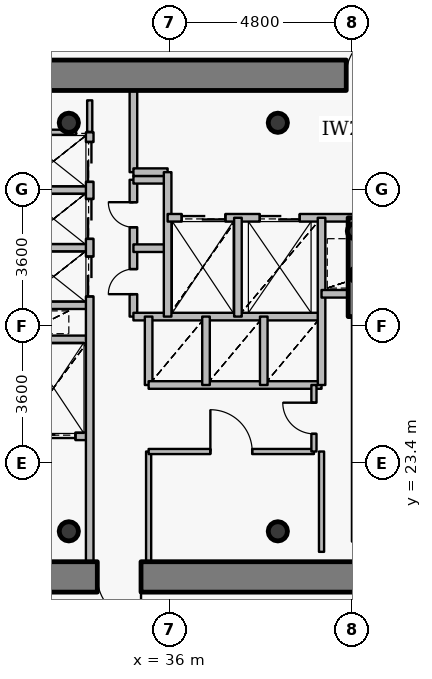
"""IFC4 building model, lengths in metres.
Left out: names, types, materials, properties, quantities, classifications, styles, units other than length and angle.
Written with IfcOpenShell. Run it as: python <this file> out.ifc"""

import sys

from ifc_helpers import new_model, si_unit, direction, frame, frame_2d, origin, origin_2d, place, context, subcontext, project, spatial, rectangle, hollow_circle, extrude, source, transform, mapped, element, fill, save


model = new_model("IFC4")
c1 = context("Model", 3, precision=1e-05, world=origin(), true_north=direction((0.0, 1.0)))
c2 = subcontext(c1, "Body", "Model", "MODEL_VIEW")
j1 = project(units=[si_unit("LENGTHUNIT", "METRE"), si_unit("PLANEANGLEUNIT", "RADIAN")], contexts=[c1])
p1 = place(None, origin())
s1 = spatial("IfcSite", under=j1, at=p1, CompositionType="ELEMENT")
p2 = place(p1, origin())
s2 = spatial("IfcBuilding", under=s1, at=p2, CompositionType="ELEMENT")
p3 = place(p2, frame((0.0, 0.0, 174.9)))
s3 = spatial("IfcBuildingStorey", under=s2, at=p3, CompositionType="ELEMENT", Elevation=174.9)
for number, where, z_axis, x_axis in (
    (1, (33.35, 21.6, 0.0), (0.0, 0.0, 1.0), (1.0, 0.0, 0.0)),
    (2, (38.85, 21.6, 0.0), (0.0, 0.0, 1.0), (1.0, 0.0, 0.0)),
    (3, (38.85, 32.35, 0.0), (0.0, 0.0, 1.0), (1.0, 0.0, 0.0)),
    (4, (33.35, 32.35, 0.0), (0.0, 0.0, 1.0), (1.0, 0.0, 0.0)),
):
    element("IfcColumn", number, at=place(p3, frame(where, z_axis=z_axis, x_axis=x_axis)), inside=s3, PredefinedType="COLUMN", context=c2, shape_type="SweptSolid", body=[
        extrude(hollow_circle(Radius=0.254, WallThickness=0.02, at=origin_2d()), origin(), (0.0, 0.0, 1.0), 3.75),
    ])
for number, where, z_axis, x_axis in (
    (5, (40.95, 28.35, 0.0), (0.0, 0.0, 1.0), (1.0, 0.0, 0.0)),
    (6, (40.88, 29.5, 0.0), (0.0, 0.0, 1.0), (1.0, 0.0, 0.0)),
):
    element("IfcColumn", number, at=place(p3, frame(where, z_axis=z_axis, x_axis=x_axis)), inside=s3, PredefinedType="COLUMN", context=c2, shape_type="SweptSolid", body=[
        extrude(hollow_circle(Radius=0.203, WallThickness=0.016, at=origin_2d()), origin(), (0.0, 0.0, 1.0), 3.75),
    ])
p4 = place(p3, frame((27.2, 33.6, 0.0), z_axis=(0.0, 0.0, 1.0), x_axis=(1.0, 0.0, 0.0)))
e7 = element("IfcWall", 7, at=p4, inside=s3, PredefinedType="SHEAR", context=c2, shape_type="SweptSolid", body=[
    extrude(rectangle(XDim=17.6, YDim=0.8, at=frame_2d((8.8, 0.0))), origin(), (0.0, 0.0, 1.0), 2.95),
])
p5 = place(p4, frame((13.45, 0.0, 0.0)))
e8 = element("IfcOpeningElement", 8, at=p5, cuts=e7, PredefinedType="OPENING", context=c2, shape_type="SweptSolid", body=[
    extrude(rectangle(XDim=1.15, YDim=2.15, at=origin_2d()), frame((0.575, 0.41, 1.075), z_axis=(0.0, -1.0, 0.0), x_axis=(1.0, 0.0, 0.0)), (0.0, 0.0, 1.0), 0.82),
])
p6 = place(p3, frame((44.8, 20.4, 0.0), z_axis=(0.0, 0.0, 1.0), x_axis=(-1.0, 0.0, 0.0)))
e9 = element("IfcWall", 9, at=p6, inside=s3, PredefinedType="SHEAR", context=c2, shape_type="SweptSolid", body=[
    extrude(rectangle(XDim=17.6, YDim=0.8, at=frame_2d((8.8, 0.0))), origin(), (0.0, 0.0, 1.0), 2.95),
])
p7 = place(p6, frame((9.55, 0.0, 0.0)))
e10 = element("IfcOpeningElement", 10, at=p7, cuts=e9, PredefinedType="OPENING", context=c2, shape_type="SweptSolid", body=[
    extrude(rectangle(XDim=1.15, YDim=2.15, at=origin_2d()), frame((0.575, 0.41, 1.075), z_axis=(0.0, -1.0, 0.0), x_axis=(1.0, 0.0, 0.0)), (0.0, 0.0, 1.0), 0.82),
])
p8 = place(p3, frame((40.9, 27.25, 0.0), z_axis=(0.0, 0.0, 1.0), x_axis=(0.0, 1.0, 0.0)))
e11 = element("IfcWall", 11, at=p8, inside=s3, PredefinedType="SHEAR", context=c2, shape_type="SweptSolid", body=[
    extrude(rectangle(XDim=2.6, YDim=0.4, at=frame_2d((1.3, 0.0))), origin(), (0.0, 0.0, 1.0), 3.1),
])
p9 = place(p3, frame((32.0, 24.1, 0.0), z_axis=(0.0, 0.0, 1.0), x_axis=(1.0, 0.0, 0.0)))
e12 = element("IfcWall", 12, at=p9, inside=s3, PredefinedType="PARTITIONING", context=c2, shape_type="SweptSolid", body=[
    extrude(rectangle(XDim=1.9, YDim=0.2, at=frame_2d((0.95, 0.0))), origin(), (0.0, 0.0, 1.0), 3.085),
])
p10 = place(p9, frame((0.375, 0.0, 0.0)))
e13 = element("IfcOpeningElement", 13, at=p10, cuts=e12, PredefinedType="OPENING", context=c2, shape_type="SweptSolid", body=[
    extrude(rectangle(XDim=1.15, YDim=2.15, at=origin_2d()), frame((0.575, 0.11, 1.075), z_axis=(0.0, -1.0, 0.0), x_axis=(1.0, 0.0, 0.0)), (0.0, 0.0, 1.0), 0.22),
])
for number, where, z_axis, x_axis in (
    (14, (32.0, 26.65, 0.0), (0.0, 0.0, 1.0), (1.0, 0.0, 0.0)),
    (15, (32.0, 27.55, 0.0), (0.0, 0.0, 1.0), (1.0, 0.0, 0.0)),
    (16, (32.0, 29.06, 0.0), (0.0, 0.0, 1.0), (1.0, 0.0, 0.0)),
    (17, (32.0, 30.58, 0.0), (0.0, 0.0, 1.0), (1.0, 0.0, 0.0)),
):
    element("IfcWall", number, at=place(p3, frame(where, z_axis=z_axis, x_axis=x_axis)), inside=s3, PredefinedType="PARTITIONING", context=c2, shape_type="SweptSolid", body=[
        extrude(rectangle(XDim=1.9, YDim=0.2, at=frame_2d((0.95, 0.0))), origin(), (0.0, 0.0, 1.0), 3.085),
    ])
p11 = place(p3, frame((33.9, 20.8, 0.0), z_axis=(0.0, 0.0, 1.0), x_axis=(0.0, 1.0, 0.0)))
e18 = element("IfcWall", 18, at=p11, inside=s3, PredefinedType="PARTITIONING", context=c2, shape_type="SweptSolid", body=[
    extrude(rectangle(XDim=11.3, YDim=0.2, at=frame_2d((5.65, 0.0))), origin(), (0.0, 0.0, 1.0), 3.085),
])
p12 = place(p11, frame((6.98, 0.0, 0.0)))
e19 = element("IfcOpeningElement", 19, at=p12, cuts=e18, PredefinedType="OPENING", context=c2, shape_type="SweptSolid", body=[
    extrude(rectangle(XDim=1.05, YDim=2.15, at=origin_2d()), frame((0.525, 0.11, 1.075), z_axis=(0.0, -1.0, 0.0), x_axis=(1.0, 0.0, 0.0)), (0.0, 0.0, 1.0), 0.22),
])
p13 = place(p11, frame((8.495, 0.0, 0.0)))
e20 = element("IfcOpeningElement", 20, at=p13, cuts=e18, PredefinedType="OPENING", context=c2, shape_type="SweptSolid", body=[
    extrude(rectangle(XDim=1.05, YDim=2.15, at=origin_2d()), frame((0.525, 0.11, 1.075), z_axis=(0.0, -1.0, 0.0), x_axis=(1.0, 0.0, 0.0)), (0.0, 0.0, 1.0), 0.22),
])
p14 = place(p11, frame((9.995, 0.0, 0.0)))
e21 = element("IfcOpeningElement", 21, at=p14, cuts=e18, PredefinedType="OPENING", context=c2, shape_type="SweptSolid", body=[
    extrude(rectangle(XDim=1.05, YDim=2.15, at=origin_2d()), frame((0.525, 0.11, 1.075), z_axis=(0.0, -1.0, 0.0), x_axis=(1.0, 0.0, 0.0)), (0.0, 0.0, 1.0), 0.22),
])
p15 = place(p3, frame((35.05, 27.25, 0.0), z_axis=(0.0, 0.0, 1.0), x_axis=(0.0, 1.0, 0.0)))
e22 = element("IfcWall", 22, at=p15, inside=s3, PredefinedType="PARTITIONING", context=c2, shape_type="SweptSolid", body=[
    extrude(rectangle(XDim=3.6, YDim=0.2, at=frame_2d((1.8, 0.0))), origin(), (0.0, 0.0, 1.0), 3.5),
])
p16 = place(p15, frame((0.59, 0.0, 0.0)))
e23 = element("IfcOpeningElement", 23, at=p16, cuts=e22, PredefinedType="OPENING", context=c2, shape_type="SweptSolid", body=[
    extrude(rectangle(XDim=0.66, YDim=2.05, at=origin_2d()), frame((0.33, 0.11, 1.025), z_axis=(0.0, -1.0, 0.0), x_axis=(1.0, 0.0, 0.0)), (0.0, 0.0, 1.0), 0.22),
])
p17 = place(p15, frame((2.35, 0.0, 0.0)))
e24 = element("IfcOpeningElement", 24, at=p17, cuts=e22, PredefinedType="OPENING", context=c2, shape_type="SweptSolid", body=[
    extrude(rectangle(XDim=0.66, YDim=2.05, at=origin_2d()), frame((0.33, 0.11, 1.025), z_axis=(0.0, -1.0, 0.0), x_axis=(1.0, 0.0, 0.0)), (0.0, 0.0, 1.0), 0.22),
])
p18 = place(p3, frame((35.05, 27.25, 0.0), z_axis=(0.0, 0.0, 1.0), x_axis=(1.0, 0.0, 0.0)))
e25 = element("IfcWall", 25, at=p18, inside=s3, PredefinedType="PARTITIONING", context=c2, shape_type="SweptSolid", body=[
    extrude(rectangle(XDim=4.95, YDim=0.2, at=frame_2d((2.475, 0.0))), origin(), (0.0, 0.0, 1.0), 3.085),
])
for number, where, z_axis, x_axis in (
    (26, (35.05, 29.05, 0.0), (0.0, 0.0, 1.0), (1.0, 0.0, 0.0)),
    (27, (35.05, 30.85, 0.0), (0.0, 0.0, 1.0), (1.0, 0.0, 0.0)),
):
    element("IfcWall", number, at=place(p3, frame(where, z_axis=z_axis, x_axis=x_axis)), inside=s3, PredefinedType="PARTITIONING", context=c2, shape_type="SweptSolid", body=[
        extrude(rectangle(XDim=0.9, YDim=0.2, at=frame_2d((0.45, 0.0))), origin(), (0.0, 0.0, 1.0), 3.5),
    ])
p19 = place(p3, frame((35.05, 31.05, 0.0), z_axis=(0.0, 0.0, 1.0), x_axis=(0.0, 1.0, 0.0)))
e28 = element("IfcWall", 28, at=p19, inside=s3, PredefinedType="PARTITIONING", context=c2, shape_type="SweptSolid", body=[
    extrude(rectangle(XDim=2.15, YDim=0.2, at=frame_2d((1.075, 0.0))), origin(), (0.0, 0.0, 1.0), 3.085),
])
p20 = place(p3, frame((35.05, 31.05, 0.0), z_axis=(0.0, 0.0, 1.0), x_axis=(1.0, 0.0, 0.0)))
e29 = element("IfcWall", 29, at=p20, inside=s3, PredefinedType="PARTITIONING", context=c2, shape_type="SweptSolid", body=[
    extrude(rectangle(XDim=0.9, YDim=0.2, at=frame_2d((0.45, 0.0))), origin(), (0.0, 0.0, 1.0), 3.5),
])
p21 = place(p3, frame((35.45, 20.8, 0.0), z_axis=(0.0, 0.0, 1.0), x_axis=(0.0, 1.0, 0.0)))
e30 = element("IfcWall", 30, at=p21, inside=s3, PredefinedType="PARTITIONING", context=c2, shape_type="SweptSolid", body=[
    extrude(rectangle(XDim=2.9, YDim=0.135, at=frame_2d((1.45, 0.0))), origin(), (0.0, 0.0, 1.0), 3.085),
])
p22 = place(p3, frame((35.45, 23.7, 0.0), z_axis=(0.0, 0.0, 1.0), x_axis=(1.0, 0.0, 0.0)))
e31 = element("IfcWall", 31, at=p22, inside=s3, PredefinedType="PARTITIONING", context=c2, shape_type="SweptSolid", body=[
    extrude(rectangle(XDim=4.35, YDim=0.135, at=frame_2d((2.175, 0.0))), origin(), (0.0, 0.0, 1.0), 3.085),
])
p23 = place(p22, frame((1.625, 0.0, 0.0)))
e32 = element("IfcOpeningElement", 32, at=p23, cuts=e31, PredefinedType="OPENING", context=c2, shape_type="SweptSolid", body=[
    extrude(rectangle(XDim=1.1, YDim=2.15, at=origin_2d()), frame((0.55, 0.078, 1.075), z_axis=(0.0, -1.0, 0.0), x_axis=(1.0, 0.0, 0.0)), (0.0, 0.0, 1.0), 0.155),
])
p24 = place(p3, frame((35.45, 25.45, 0.0), z_axis=(0.0, 0.0, 1.0), x_axis=(0.0, 1.0, 0.0)))
e33 = element("IfcWall", 33, at=p24, inside=s3, PredefinedType="PARTITIONING", context=c2, shape_type="SweptSolid", body=[
    extrude(rectangle(XDim=1.8, YDim=0.2, at=frame_2d((0.9, 0.0))), origin(), (0.0, 0.0, 1.0), 3.5),
])
p25 = place(p3, frame((35.45, 25.45, 0.0), z_axis=(0.0, 0.0, 1.0), x_axis=(1.0, 0.0, 0.0)))
e34 = element("IfcWall", 34, at=p25, inside=s3, PredefinedType="PARTITIONING", context=c2, shape_type="SweptSolid", body=[
    extrude(rectangle(XDim=4.55, YDim=0.2, at=frame_2d((2.275, 0.0))), origin(), (0.0, 0.0, 1.0), 3.085),
])
p26 = place(p3, frame((35.95, 27.25, 0.0), z_axis=(0.0, 0.0, 1.0), x_axis=(0.0, 1.0, 0.0)))
e35 = element("IfcWall", 35, at=p26, inside=s3, PredefinedType="PARTITIONING", context=c2, shape_type="SweptSolid", body=[
    extrude(rectangle(XDim=3.8, YDim=0.2, at=frame_2d((1.9, 0.0))), origin(), (0.0, 0.0, 1.0), 3.5),
])
p27 = place(p3, frame((35.95, 29.85, 0.0), z_axis=(0.0, 0.0, 1.0), x_axis=(1.0, 0.0, 0.0)))
e36 = element("IfcWall", 36, at=p27, inside=s3, PredefinedType="PARTITIONING", context=c2, shape_type="SweptSolid", body=[
    extrude(rectangle(XDim=8.49, YDim=0.2, at=frame_2d((4.245, 0.0))), origin(), (0.0, 0.0, 1.0), 3.085),
])
p28 = place(p27, frame((6.1, 0.0, 0.0)))
e37 = element("IfcOpeningElement", 37, at=p28, cuts=e36, PredefinedType="OPENING", context=c2, shape_type="SweptSolid", body=[
    extrude(rectangle(XDim=1.2, YDim=2.15, at=origin_2d()), frame((0.6, 0.11, 1.075), z_axis=(0.0, -1.0, 0.0), x_axis=(1.0, 0.0, 0.0)), (0.0, 0.0, 1.0), 0.22),
])
p29 = place(p27, frame((0.37, 0.0, 0.0)))
e38 = element("IfcOpeningElement", 38, at=p29, cuts=e36, PredefinedType="OPENING", context=c2, shape_type="SweptSolid", body=[
    extrude(rectangle(XDim=1.15, YDim=2.15, at=origin_2d()), frame((0.575, 0.11, 1.075), z_axis=(0.0, -1.0, 0.0), x_axis=(1.0, 0.0, 0.0)), (0.0, 0.0, 1.0), 0.22),
])
p30 = place(p27, frame((2.425, 0.0, 0.0)))
e39 = element("IfcOpeningElement", 39, at=p30, cuts=e36, PredefinedType="OPENING", context=c2, shape_type="SweptSolid", body=[
    extrude(rectangle(XDim=1.05, YDim=2.15, at=origin_2d()), frame((0.525, 0.11, 1.075), z_axis=(0.0, -1.0, 0.0), x_axis=(1.0, 0.0, 0.0)), (0.0, 0.0, 1.0), 0.22),
])
p31 = place(p3, frame((36.96, 25.45, 0.0), z_axis=(0.0, 0.0, 1.0), x_axis=(0.0, 1.0, 0.0)))
e40 = element("IfcWall", 40, at=p31, inside=s3, PredefinedType="PARTITIONING", context=c2, shape_type="SweptSolid", body=[
    extrude(rectangle(XDim=1.8, YDim=0.2, at=frame_2d((0.9, 0.0))), origin(), (0.0, 0.0, 1.0), 3.5),
])
p32 = place(p3, frame((37.8, 27.25, 0.0), z_axis=(0.0, 0.0, 1.0), x_axis=(0.0, 1.0, 0.0)))
e41 = element("IfcWall", 41, at=p32, inside=s3, PredefinedType="PARTITIONING", context=c2, shape_type="SweptSolid", body=[
    extrude(rectangle(XDim=2.6, YDim=0.2, at=frame_2d((1.3, 0.0))), origin(), (0.0, 0.0, 1.0), 3.5),
])
p33 = place(p3, frame((38.48, 25.45, 0.0), z_axis=(0.0, 0.0, 1.0), x_axis=(0.0, 1.0, 0.0)))
e42 = element("IfcWall", 42, at=p33, inside=s3, PredefinedType="PARTITIONING", context=c2, shape_type="SweptSolid", body=[
    extrude(rectangle(XDim=1.8, YDim=0.2, at=frame_2d((0.9, 0.0))), origin(), (0.0, 0.0, 1.0), 3.5),
])
p34 = place(p3, frame((39.8, 23.7, 0.0), z_axis=(0.0, 0.0, 1.0), x_axis=(0.0, 1.0, 0.0)))
e43 = element("IfcWall", 43, at=p34, inside=s3, PredefinedType="PARTITIONING", context=c2, shape_type="SweptSolid", body=[
    extrude(rectangle(XDim=1.75, YDim=0.135, at=frame_2d((0.875, 0.0))), origin(), (0.0, 0.0, 1.0), 3.5),
])
p35 = place(p34, frame((0.465, 0.0, 0.0)))
e44 = element("IfcOpeningElement", 44, at=p35, cuts=e43, PredefinedType="OPENING", context=c2, shape_type="SweptSolid", body=[
    extrude(rectangle(XDim=0.82, YDim=2.1, at=origin_2d()), frame((0.41, 0.078, 1.05), z_axis=(0.0, -1.0, 0.0), x_axis=(1.0, 0.0, 0.0)), (0.0, 0.0, 1.0), 0.155),
])
p36 = place(p3, frame((40.0, 25.45, 0.0), z_axis=(0.0, 0.0, 1.0), x_axis=(0.0, 1.0, 0.0)))
e45 = element("IfcWall", 45, at=p36, inside=s3, PredefinedType="PARTITIONING", context=c2, shape_type="SweptSolid", body=[
    extrude(rectangle(XDim=4.4, YDim=0.2, at=frame_2d((2.2, 0.0))), origin(), (0.0, 0.0, 1.0), 3.5),
])
p37 = place(p3, frame((40.0, 27.85, 0.0), z_axis=(0.0, 0.0, 1.0), x_axis=(1.0, 0.0, 0.0)))
e46 = element("IfcWall", 46, at=p37, inside=s3, PredefinedType="PARTITIONING", context=c2, shape_type="SweptSolid", body=[
    extrude(rectangle(XDim=0.9, YDim=0.2, at=frame_2d((0.45, 0.0))), origin(), (0.0, 0.0, 1.0), 3.5),
])
p38 = place(p3, frame((40.9, 21.33, 0.0), z_axis=(0.0, 0.0, 1.0), x_axis=(0.0, 1.0, 0.0)))
e47 = element("IfcWall", 47, at=p38, inside=s3, PredefinedType="PARTITIONING", context=c2, shape_type="SweptSolid", body=[
    extrude(rectangle(XDim=5.91, YDim=0.2, at=frame_2d((2.955, 0.0))), origin(), (0.0, 0.0, 1.0), 3.035),
])
p39 = place(p3, frame((32.36, 32.1, 0.0), z_axis=(0.0, 0.0, 1.0), x_axis=(1.0, 0.0, 0.0)))
e48 = element("IfcWall", 48, at=p39, inside=s3, PredefinedType="PARTITIONING", context=c2, shape_type="SweptSolid", body=[
    extrude(rectangle(XDim=1.18, YDim=0.135, at=frame_2d((0.59, 0.0))), origin(), (0.0, 0.0, 1.0), 3.085),
])
p40 = place(p3, frame((40.0, 23.7, 0.0), z_axis=(0.0, 0.0, 1.0), x_axis=(0.0, -1.0, 0.0)))
e49 = element("IfcWall", 49, at=p40, inside=s3, PredefinedType="PARTITIONING", context=c2, shape_type="SweptSolid", body=[
    extrude(rectangle(XDim=2.64, YDim=0.135, at=frame_2d((1.32, 0.0))), origin(), (0.0, 0.0, 1.0), 3.035),
])
p41 = place(p3, frame((33.9, 32.11, 0.0), z_axis=(0.0, 0.0, 1.0), x_axis=(0.0, 1.0, 0.0)))
e50 = element("IfcWall", 50, at=p41, inside=s3, PredefinedType="PARTITIONING", context=c2, shape_type="SweptSolid", body=[
    extrude(rectangle(XDim=0.83, YDim=0.135, at=frame_2d((0.415, 0.0))), origin(), (0.0, 0.0, 1.0), 3.085),
])
m1 = source(origin(), c2, "Body", "SweptSolid", [
    extrude(rectangle(XDim=1.15, YDim=2.15, at=origin_2d()), frame((0.575, 0.025, 1.075), z_axis=(0.0, -1.0, 0.0), x_axis=(1.0, 0.0, 0.0)), (0.0, 0.0, 1.0), 0.05),
])
p42 = place(p5, origin())
e51 = element("IfcDoor", 51, at=p42, inside=s3, OperationType="SINGLE_SWING_RIGHT", PredefinedType="DOOR", context=c2, shape_type="MappedRepresentation", body=[
    mapped(m1, transform((0.0, 0.0, 0.0), x_axis=(1.0, 0.0, 0.0), y_axis=(0.0, 1.0, 0.0), z_axis=(0.0, 0.0, 1.0), scale=1.0)),
])
fill(e8, e51)
p43 = place(p7, origin())
e52 = element("IfcDoor", 52, at=p43, inside=s3, OperationType="SINGLE_SWING_LEFT", PredefinedType="DOOR", context=c2, shape_type="MappedRepresentation", body=[
    mapped(m1, transform((0.0, 0.0, 0.0), x_axis=(1.0, 0.0, 0.0), y_axis=(0.0, 1.0, 0.0), z_axis=(0.0, 0.0, 1.0), scale=1.0)),
])
fill(e10, e52)
m2 = source(origin(), c2, "Body", "SweptSolid", [
    extrude(rectangle(XDim=1.15, YDim=2.15, at=origin_2d()), frame((0.575, 0.025, 1.075), z_axis=(0.0, -1.0, 0.0), x_axis=(1.0, 0.0, 0.0)), (0.0, 0.0, 1.0), 0.05),
])
p44 = place(p29, origin())
e53 = element("IfcDoor", 53, at=p44, inside=s3, OperationType="DOUBLE_DOOR_SLIDING", PredefinedType="USERDEFINED", context=c2, shape_type="MappedRepresentation", body=[
    mapped(m2, transform((0.0, 0.0, 0.0), x_axis=(1.0, 0.0, 0.0), y_axis=(0.0, 1.0, 0.0), z_axis=(0.0, 0.0, 1.0), scale=1.0)),
])
fill(e38, e53)
p45 = place(p10, origin())
e54 = element("IfcDoor", 54, at=p45, inside=s3, OperationType="DOUBLE_DOOR_SLIDING", PredefinedType="USERDEFINED", context=c2, shape_type="MappedRepresentation", body=[
    mapped(m2, transform((0.0, 0.0, 0.0), x_axis=(1.0, 0.0, 0.0), y_axis=(0.0, 1.0, 0.0), z_axis=(0.0, 0.0, 1.0), scale=1.0)),
])
fill(e13, e54)
m3 = source(origin(), c2, "Body", "SweptSolid", [
    extrude(rectangle(XDim=1.05, YDim=2.15, at=origin_2d()), frame((0.525, 0.025, 1.075), z_axis=(0.0, -1.0, 0.0), x_axis=(1.0, 0.0, 0.0)), (0.0, 0.0, 1.0), 0.05),
])
p46 = place(p30, origin())
e55 = element("IfcDoor", 55, at=p46, inside=s3, OperationType="DOUBLE_DOOR_SLIDING", PredefinedType="USERDEFINED", context=c2, shape_type="MappedRepresentation", body=[
    mapped(m3, transform((0.0, 0.0, 0.0), x_axis=(1.0, 0.0, 0.0), y_axis=(0.0, 1.0, 0.0), z_axis=(0.0, 0.0, 1.0), scale=1.0)),
])
fill(e39, e55)
p47 = place(p12, origin())
e56 = element("IfcDoor", 56, at=p47, inside=s3, OperationType="DOUBLE_DOOR_SLIDING", PredefinedType="USERDEFINED", context=c2, shape_type="MappedRepresentation", body=[
    mapped(m3, transform((0.0, 0.0, 0.0), x_axis=(1.0, 0.0, 0.0), y_axis=(0.0, 1.0, 0.0), z_axis=(0.0, 0.0, 1.0), scale=1.0)),
])
fill(e19, e56)
p48 = place(p13, origin())
e57 = element("IfcDoor", 57, at=p48, inside=s3, OperationType="DOUBLE_DOOR_SLIDING", PredefinedType="USERDEFINED", context=c2, shape_type="MappedRepresentation", body=[
    mapped(m3, transform((0.0, 0.0, 0.0), x_axis=(1.0, 0.0, 0.0), y_axis=(0.0, 1.0, 0.0), z_axis=(0.0, 0.0, 1.0), scale=1.0)),
])
fill(e20, e57)
p49 = place(p14, origin())
e58 = element("IfcDoor", 58, at=p49, inside=s3, OperationType="DOUBLE_DOOR_SLIDING", PredefinedType="USERDEFINED", context=c2, shape_type="MappedRepresentation", body=[
    mapped(m3, transform((0.0, 0.0, 0.0), x_axis=(1.0, 0.0, 0.0), y_axis=(0.0, 1.0, 0.0), z_axis=(0.0, 0.0, 1.0), scale=1.0)),
])
fill(e21, e58)
m4 = source(origin(), c2, "Body", "SweptSolid", [
    extrude(rectangle(XDim=0.66, YDim=2.05, at=origin_2d()), frame((0.33, 0.025, 1.025), z_axis=(0.0, -1.0, 0.0), x_axis=(1.0, 0.0, 0.0)), (0.0, 0.0, 1.0), 0.05),
])
p50 = place(p16, origin())
e59 = element("IfcDoor", 59, at=p50, inside=s3, OperationType="SINGLE_SWING_LEFT", PredefinedType="USERDEFINED", context=c2, shape_type="MappedRepresentation", body=[
    mapped(m4, transform((0.0, 0.0, 0.0), x_axis=(1.0, 0.0, 0.0), y_axis=(0.0, 1.0, 0.0), z_axis=(0.0, 0.0, 1.0), scale=1.0)),
])
fill(e23, e59)
p51 = place(p17, origin())
e60 = element("IfcDoor", 60, at=p51, inside=s3, OperationType="SINGLE_SWING_RIGHT", PredefinedType="USERDEFINED", context=c2, shape_type="MappedRepresentation", body=[
    mapped(m4, transform((0.0, 0.0, 0.0), x_axis=(1.0, 0.0, 0.0), y_axis=(0.0, 1.0, 0.0), z_axis=(0.0, 0.0, 1.0), scale=1.0)),
])
fill(e24, e60)
m5 = source(origin(), c2, "Body", "SweptSolid", [
    extrude(rectangle(XDim=1.1, YDim=2.15, at=origin_2d()), frame((0.55, 0.025, 1.075), z_axis=(0.0, -1.0, 0.0), x_axis=(1.0, 0.0, 0.0)), (0.0, 0.0, 1.0), 0.05),
])
p52 = place(p23, origin())
e61 = element("IfcDoor", 61, at=p52, inside=s3, OperationType="SINGLE_SWING_LEFT", PredefinedType="DOOR", context=c2, shape_type="MappedRepresentation", body=[
    mapped(m5, transform((0.0, 0.0, 0.0), x_axis=(1.0, 0.0, 0.0), y_axis=(0.0, 1.0, 0.0), z_axis=(0.0, 0.0, 1.0), scale=1.0)),
])
fill(e32, e61)
m6 = source(origin(), c2, "Body", "SweptSolid", [
    extrude(rectangle(XDim=0.82, YDim=2.1, at=origin_2d()), frame((0.41, 0.025, 1.05), z_axis=(0.0, -1.0, 0.0), x_axis=(1.0, 0.0, 0.0)), (0.0, 0.0, 1.0), 0.05),
])
p53 = place(p35, origin())
e62 = element("IfcDoor", 62, at=p53, inside=s3, OperationType="SINGLE_SWING_RIGHT", PredefinedType="DOOR", context=c2, shape_type="MappedRepresentation", body=[
    mapped(m6, transform((0.0, 0.0, 0.0), x_axis=(1.0, 0.0, 0.0), y_axis=(0.0, 1.0, 0.0), z_axis=(0.0, 0.0, 1.0), scale=1.0)),
])
fill(e44, e62)
save(model, sys.argv[1])
